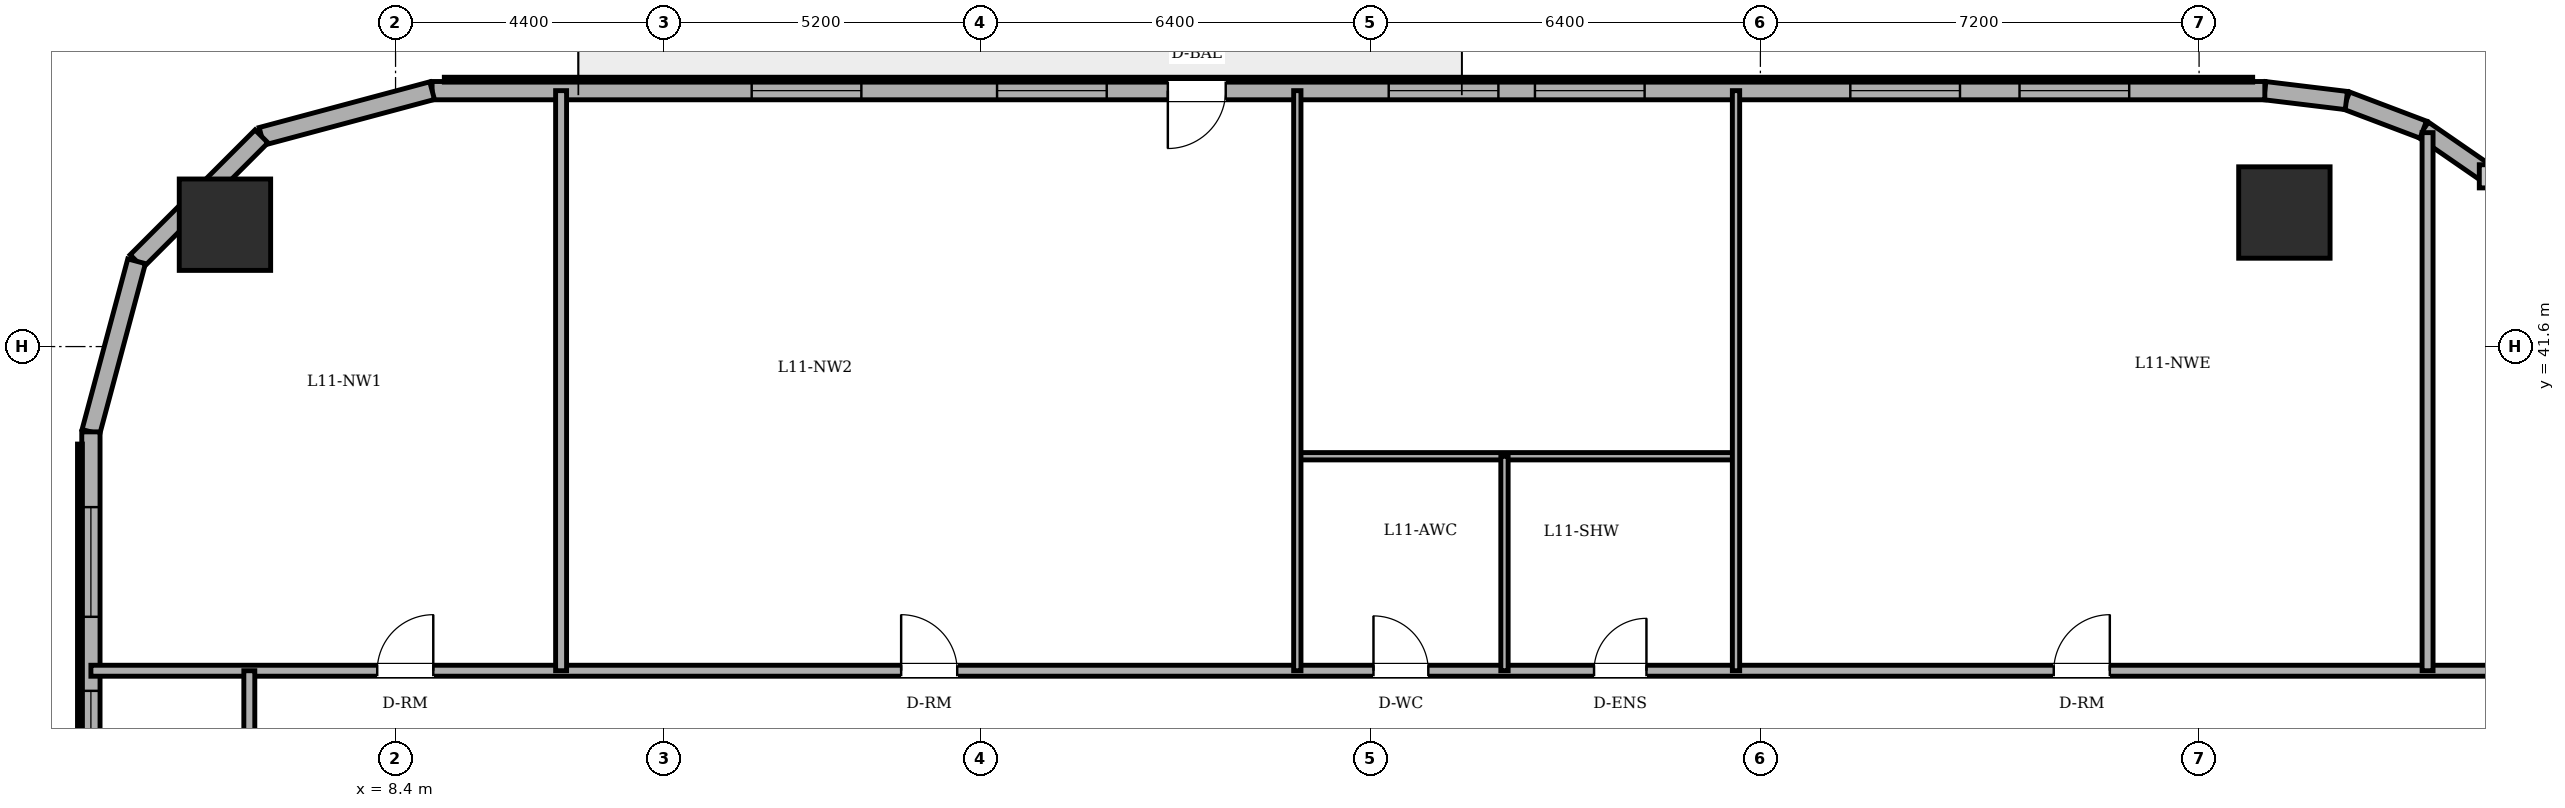
"""IFC4 building model, lengths in metres.
Left out: names, types, materials, properties, quantities, classifications, styles, units other than length and angle.
Written with IfcOpenShell. Run it as: python <this file> out.ifc"""

import sys

from ifc_helpers import new_model, si_unit, direction, frame, frame_2d, origin, origin_2d, place, context, subcontext, project, spatial, rectangle, circle, extrude, element, fill, save


model = new_model("IFC4")
c1 = context("Model", 3, precision=1e-05, world=origin(), true_north=direction((0.0, 1.0)))
c2 = subcontext(c1, "Body", "Model", "MODEL_VIEW")
j1 = project(units=[si_unit("LENGTHUNIT", "METRE"), si_unit("PLANEANGLEUNIT", "RADIAN")], contexts=[c1])
p1 = place(None, origin())
s1 = spatial("IfcSite", under=j1, at=p1, CompositionType="ELEMENT")
p2 = place(p1, origin())
s2 = spatial("IfcBuilding", under=s1, at=p2, CompositionType="ELEMENT")
p3 = place(p2, frame((0.0, 0.0, 43.2)))
s3 = spatial("IfcBuildingStorey", under=s2, at=p3, CompositionType="ELEMENT", Elevation=43.2)
for number, where, z_axis, x_axis in (
    (1, (39.4, 43.8, 0.0), (0.0, 0.0, 1.0), (1.0, 0.0, 0.0)),
    (2, (5.6, 43.6, 0.0), (0.0, 0.0, 1.0), (1.0, 0.0, 0.0)),
):
    element("IfcColumn", number, at=place(p3, frame(where, z_axis=z_axis, x_axis=x_axis)), inside=s3, PredefinedType="COLUMN", context=c2, shape_type="SweptSolid", body=[
        extrude(circle(Radius=0.75, at=origin_2d()), origin(), (0.0, 0.0, 1.0), 3.6),
    ])
p4 = place(p3, frame((42.789, 44.394, 0.0), z_axis=(0.0, 0.0, 1.0), x_axis=(-0.823116500192, 0.567872544777, 0.0)))
e3 = element("IfcWall", 3, at=p4, inside=s3, PredefinedType="SOLIDWALL", context=c2, shape_type="SweptSolid", body=[
    extrude(rectangle(XDim=1.349, YDim=0.3, at=frame_2d((0.674, 0.0))), origin(), (0.0, 0.0, 1.0), 3.4),
])
p5 = place(p3, frame((41.679, 45.16, 0.0), z_axis=(0.0, 0.0, 1.0), x_axis=(-0.935156721165, 0.354234254216, 0.0)))
e4 = element("IfcWall", 4, at=p5, inside=s3, PredefinedType="SOLIDWALL", context=c2, shape_type="SweptSolid", body=[
    extrude(rectangle(XDim=1.349, YDim=0.3, at=frame_2d((0.675, 0.0))), origin(), (0.0, 0.0, 1.0), 3.4),
])
p6 = place(p3, frame((40.417, 45.638, 0.0), z_axis=(0.0, 0.0, 1.0), x_axis=(-0.992739027259, 0.120288086515, 0.0)))
e5 = element("IfcWall", 5, at=p6, inside=s3, PredefinedType="SOLIDWALL", context=c2, shape_type="SweptSolid", body=[
    extrude(rectangle(XDim=1.348, YDim=0.3, at=frame_2d((0.674, 0.0))), origin(), (0.0, 0.0, 1.0), 3.4),
])
p7 = place(p3, frame((39.079, 45.8, 0.0), z_axis=(0.0, 0.0, 1.0), x_axis=(-1.0, 0.0, 0.0)))
e6 = element("IfcWall", 6, at=p7, inside=s3, PredefinedType="SOLIDWALL", context=c2, shape_type="SweptSolid", body=[
    extrude(rectangle(XDim=30.079, YDim=0.3, at=frame_2d((15.04, 0.0))), origin(), (0.0, 0.0, 1.0), 3.4),
])
p8 = place(p7, frame((17.054, 0.0, 0.0)))
e7 = element("IfcOpeningElement", 7, at=p8, cuts=e6, PredefinedType="OPENING", context=c2, shape_type="SweptSolid", body=[
    extrude(rectangle(XDim=0.95, YDim=2.2, at=frame_2d((0.475, 1.1))), frame((0.0, 0.16, 0.0), z_axis=(0.0, -1.0, 0.0), x_axis=(1.0, 0.0, 0.0)), (0.0, 0.0, 1.0), 0.32),
])
p9 = place(p7, frame((2.226, 0.0, 0.85)))
e8 = element("IfcOpeningElement", 8, at=p9, cuts=e6, PredefinedType="OPENING", context=c2, shape_type="SweptSolid", body=[
    extrude(rectangle(XDim=1.8, YDim=1.55, at=frame_2d((0.9, 0.775))), frame((0.0, 0.16, 0.0), z_axis=(0.0, -1.0, 0.0), x_axis=(1.0, 0.0, 0.0)), (0.0, 0.0, 1.0), 0.32),
])
p10 = place(p7, frame((5.003, 0.0, 0.85)))
e9 = element("IfcOpeningElement", 9, at=p10, cuts=e6, PredefinedType="OPENING", context=c2, shape_type="SweptSolid", body=[
    extrude(rectangle(XDim=1.8, YDim=1.55, at=frame_2d((0.9, 0.775))), frame((0.0, 0.16, 0.0), z_axis=(0.0, -1.0, 0.0), x_axis=(1.0, 0.0, 0.0)), (0.0, 0.0, 1.0), 0.32),
])
p11 = place(p7, frame((10.179, 0.0, 0.85)))
e10 = element("IfcOpeningElement", 10, at=p11, cuts=e6, PredefinedType="OPENING", context=c2, shape_type="SweptSolid", body=[
    extrude(rectangle(XDim=1.8, YDim=1.55, at=frame_2d((0.9, 0.775))), frame((0.0, 0.16, 0.0), z_axis=(0.0, -1.0, 0.0), x_axis=(1.0, 0.0, 0.0)), (0.0, 0.0, 1.0), 0.32),
])
p12 = place(p7, frame((12.579, 0.0, 0.85)))
e11 = element("IfcOpeningElement", 11, at=p12, cuts=e6, PredefinedType="OPENING", context=c2, shape_type="SweptSolid", body=[
    extrude(rectangle(XDim=1.8, YDim=1.55, at=frame_2d((0.9, 0.775))), frame((0.0, 0.16, 0.0), z_axis=(0.0, -1.0, 0.0), x_axis=(1.0, 0.0, 0.0)), (0.0, 0.0, 1.0), 0.32),
])
p13 = place(p7, frame((19.007, 0.0, 0.85)))
e12 = element("IfcOpeningElement", 12, at=p13, cuts=e6, PredefinedType="OPENING", context=c2, shape_type="SweptSolid", body=[
    extrude(rectangle(XDim=1.8, YDim=1.55, at=frame_2d((0.9, 0.775))), frame((0.0, 0.16, 0.0), z_axis=(0.0, -1.0, 0.0), x_axis=(1.0, 0.0, 0.0)), (0.0, 0.0, 1.0), 0.32),
])
p14 = place(p7, frame((23.034, 0.0, 0.85)))
e13 = element("IfcOpeningElement", 13, at=p14, cuts=e6, PredefinedType="OPENING", context=c2, shape_type="SweptSolid", body=[
    extrude(rectangle(XDim=1.8, YDim=1.55, at=frame_2d((0.9, 0.775))), frame((0.0, 0.16, 0.0), z_axis=(0.0, -1.0, 0.0), x_axis=(1.0, 0.0, 0.0)), (0.0, 0.0, 1.0), 0.32),
])
p15 = place(p3, frame((9.0, 45.8, 0.0), z_axis=(0.0, 0.0, 1.0), x_axis=(-0.96594917914, -0.258731875344, 0.0)))
e14 = element("IfcWall", 14, at=p15, inside=s3, PredefinedType="SOLIDWALL", context=c2, shape_type="SweptSolid", body=[
    extrude(rectangle(XDim=2.899, YDim=0.3, at=frame_2d((1.449, 0.0))), origin(), (0.0, 0.0, 1.0), 3.4),
])
p16 = place(p3, frame((6.2, 45.05, 0.0), z_axis=(0.0, 0.0, 1.0), x_axis=(-0.707106781187, -0.707106781187, 0.0)))
e15 = element("IfcWall", 15, at=p16, inside=s3, PredefinedType="SOLIDWALL", context=c2, shape_type="SweptSolid", body=[
    extrude(rectangle(XDim=2.899, YDim=0.3, at=frame_2d((1.45, 0.0))), origin(), (0.0, 0.0, 1.0), 3.4),
])
p17 = place(p3, frame((4.15, 43.0, 0.0), z_axis=(0.0, 0.0, 1.0), x_axis=(-0.258731875344, -0.96594917914, 0.0)))
e16 = element("IfcWall", 16, at=p17, inside=s3, PredefinedType="SOLIDWALL", context=c2, shape_type="SweptSolid", body=[
    extrude(rectangle(XDim=2.899, YDim=0.3, at=frame_2d((1.449, 0.0))), origin(), (0.0, 0.0, 1.0), 3.4),
])
p18 = place(p3, frame((3.4, 40.2, 0.0), z_axis=(0.0, 0.0, 1.0), x_axis=(0.0, -1.0, 0.0)))
e17 = element("IfcWall", 17, at=p18, inside=s3, PredefinedType="SOLIDWALL", context=c2, shape_type="SweptSolid", body=[
    extrude(rectangle(XDim=32.4, YDim=0.3, at=frame_2d((16.2, 0.0))), origin(), (0.0, 0.0, 1.0), 3.4),
])
p19 = place(p18, frame((1.235, 0.0, 0.85)))
e18 = element("IfcOpeningElement", 18, at=p19, cuts=e17, PredefinedType="OPENING", context=c2, shape_type="SweptSolid", body=[
    extrude(rectangle(XDim=1.8, YDim=1.55, at=frame_2d((0.9, 0.775))), frame((0.0, 0.16, 0.0), z_axis=(0.0, -1.0, 0.0), x_axis=(1.0, 0.0, 0.0)), (0.0, 0.0, 1.0), 0.32),
])
p20 = place(p18, frame((4.25, 0.0, 0.85)))
e19 = element("IfcOpeningElement", 19, at=p20, cuts=e17, PredefinedType="OPENING", context=c2, shape_type="SweptSolid", body=[
    extrude(rectangle(XDim=1.8, YDim=1.55, at=frame_2d((0.9, 0.775))), frame((0.0, 0.16, 0.0), z_axis=(0.0, -1.0, 0.0), x_axis=(1.0, 0.0, 0.0)), (0.0, 0.0, 1.0), 0.32),
])
p21 = place(p18, frame((9.253, 0.0, 0.85)))
e20 = element("IfcOpeningElement", 20, at=p21, cuts=e17, PredefinedType="OPENING", context=c2, shape_type="SweptSolid", body=[
    extrude(rectangle(XDim=1.8, YDim=1.55, at=frame_2d((0.9, 0.775))), frame((0.0, 0.16, 0.0), z_axis=(0.0, -1.0, 0.0), x_axis=(1.0, 0.0, 0.0)), (0.0, 0.0, 1.0), 0.32),
])
p22 = place(p18, frame((13.027, 0.0, 0.85)))
e21 = element("IfcOpeningElement", 21, at=p22, cuts=e17, PredefinedType="OPENING", context=c2, shape_type="SweptSolid", body=[
    extrude(rectangle(XDim=1.8, YDim=1.55, at=frame_2d((0.9, 0.775))), frame((0.0, 0.16, 0.0), z_axis=(0.0, -1.0, 0.0), x_axis=(1.0, 0.0, 0.0)), (0.0, 0.0, 1.0), 0.32),
])
p23 = place(p18, frame((19.573, 0.0, 0.85)))
e22 = element("IfcOpeningElement", 22, at=p23, cuts=e17, PredefinedType="OPENING", context=c2, shape_type="SweptSolid", body=[
    extrude(rectangle(XDim=1.8, YDim=1.55, at=frame_2d((0.9, 0.775))), frame((0.0, 0.16, 0.0), z_axis=(0.0, -1.0, 0.0), x_axis=(1.0, 0.0, 0.0)), (0.0, 0.0, 1.0), 0.32),
])
p24 = place(p18, frame((22.347, 0.0, 0.85)))
e23 = element("IfcOpeningElement", 23, at=p24, cuts=e17, PredefinedType="OPENING", context=c2, shape_type="SweptSolid", body=[
    extrude(rectangle(XDim=1.8, YDim=1.55, at=frame_2d((0.9, 0.775))), frame((0.0, 0.16, 0.0), z_axis=(0.0, -1.0, 0.0), x_axis=(1.0, 0.0, 0.0)), (0.0, 0.0, 1.0), 0.32),
])
p25 = place(p18, frame((26.35, 0.0, 0.85)))
e24 = element("IfcOpeningElement", 24, at=p25, cuts=e17, PredefinedType="OPENING", context=c2, shape_type="SweptSolid", body=[
    extrude(rectangle(XDim=1.8, YDim=1.55, at=frame_2d((0.9, 0.775))), frame((0.0, 0.16, 0.0), z_axis=(0.0, -1.0, 0.0), x_axis=(1.0, 0.0, 0.0)), (0.0, 0.0, 1.0), 0.32),
])
p26 = place(p18, frame((29.365, 0.0, 0.85)))
e25 = element("IfcOpeningElement", 25, at=p26, cuts=e17, PredefinedType="OPENING", context=c2, shape_type="SweptSolid", body=[
    extrude(rectangle(XDim=1.8, YDim=1.55, at=frame_2d((0.9, 0.775))), frame((0.0, 0.16, 0.0), z_axis=(0.0, -1.0, 0.0), x_axis=(1.0, 0.0, 0.0)), (0.0, 0.0, 1.0), 0.32),
])
p27 = place(p3, frame((3.4, 36.28, 0.0), z_axis=(0.0, 0.0, 1.0), x_axis=(1.0, 0.0, 0.0)))
e26 = element("IfcWall", 26, at=p27, inside=s3, PredefinedType="PARTITIONING", context=c2, shape_type="SweptSolid", body=[
    extrude(rectangle(XDim=47.689, YDim=0.18, at=frame_2d((23.845, 0.0))), origin(), (0.0, 0.0, 1.0), 3.4),
])
p28 = place(p27, frame((21.05, 0.0, 0.0)))
e27 = element("IfcOpeningElement", 27, at=p28, cuts=e26, PredefinedType="OPENING", context=c2, shape_type="SweptSolid", body=[
    extrude(rectangle(XDim=0.9, YDim=2.1, at=frame_2d((0.45, 1.05))), frame((0.0, 0.1, 0.0), z_axis=(0.0, -1.0, 0.0), x_axis=(1.0, 0.0, 0.0)), (0.0, 0.0, 1.0), 0.2),
])
p29 = place(p27, frame((24.67, 0.0, 0.0)))
e28 = element("IfcOpeningElement", 28, at=p29, cuts=e26, PredefinedType="OPENING", context=c2, shape_type="SweptSolid", body=[
    extrude(rectangle(XDim=0.86, YDim=2.1, at=frame_2d((0.43, 1.05))), frame((0.0, 0.1, 0.0), z_axis=(0.0, -1.0, 0.0), x_axis=(1.0, 0.0, 0.0)), (0.0, 0.0, 1.0), 0.2),
])
p30 = place(p27, frame((40.39, 0.0, 0.0)))
e29 = element("IfcOpeningElement", 29, at=p30, cuts=e26, PredefinedType="OPENING", context=c2, shape_type="SweptSolid", body=[
    extrude(rectangle(XDim=0.92, YDim=2.1, at=frame_2d((0.46, 1.05))), frame((0.0, 0.1, 0.0), z_axis=(0.0, -1.0, 0.0), x_axis=(1.0, 0.0, 0.0)), (0.0, 0.0, 1.0), 0.2),
])
p31 = place(p27, frame((4.699, 0.0, 0.0)))
e30 = element("IfcOpeningElement", 30, at=p31, cuts=e26, PredefinedType="OPENING", context=c2, shape_type="SweptSolid", body=[
    extrude(rectangle(XDim=0.92, YDim=2.1, at=frame_2d((0.46, 1.05))), frame((0.0, 0.1, 0.0), z_axis=(0.0, -1.0, 0.0), x_axis=(1.0, 0.0, 0.0)), (0.0, 0.0, 1.0), 0.2),
])
p32 = place(p27, frame((13.298, 0.0, 0.0)))
e31 = element("IfcOpeningElement", 31, at=p32, cuts=e26, PredefinedType="OPENING", context=c2, shape_type="SweptSolid", body=[
    extrude(rectangle(XDim=0.92, YDim=2.1, at=frame_2d((0.46, 1.05))), frame((0.0, 0.1, 0.0), z_axis=(0.0, -1.0, 0.0), x_axis=(1.0, 0.0, 0.0)), (0.0, 0.0, 1.0), 0.2),
])
p33 = place(p27, frame((32.215, 0.0, 0.0)))
e32 = element("IfcOpeningElement", 32, at=p33, cuts=e26, PredefinedType="OPENING", context=c2, shape_type="SweptSolid", body=[
    extrude(rectangle(XDim=0.92, YDim=2.1, at=frame_2d((0.46, 1.05))), frame((0.0, 0.1, 0.0), z_axis=(0.0, -1.0, 0.0), x_axis=(1.0, 0.0, 0.0)), (0.0, 0.0, 1.0), 0.2),
])
p34 = place(p3, frame((23.2, 39.8, 0.0), z_axis=(0.0, 0.0, 1.0), x_axis=(1.0, 0.0, 0.0)))
e33 = element("IfcWall", 33, at=p34, inside=s3, PredefinedType="PARTITIONING", context=c2, shape_type="SweptSolid", body=[
    extrude(rectangle(XDim=7.2, YDim=0.12, at=frame_2d((3.6, 0.0))), origin(), (0.0, 0.0, 1.0), 3.4),
])
p35 = place(p3, frame((6.0, 33.82, 0.0), z_axis=(0.0, 0.0, 1.0), x_axis=(0.0, 1.0, 0.0)))
e34 = element("IfcWall", 34, at=p35, inside=s3, PredefinedType="PARTITIONING", context=c2, shape_type="SweptSolid", body=[
    extrude(rectangle(XDim=2.46, YDim=0.18, at=frame_2d((1.23, 0.0))), origin(), (0.0, 0.0, 1.0), 3.4),
])
p36 = place(p3, frame((11.117, 36.28, 0.0), z_axis=(0.0, 0.0, 1.0), x_axis=(0.0, 1.0, 0.0)))
e35 = element("IfcWall", 35, at=p36, inside=s3, PredefinedType="PARTITIONING", context=c2, shape_type="SweptSolid", body=[
    extrude(rectangle(XDim=9.52, YDim=0.18, at=frame_2d((4.76, 0.0))), origin(), (0.0, 0.0, 1.0), 3.4),
])
p37 = place(p3, frame((23.2, 36.28, 0.0), z_axis=(0.0, 0.0, 1.0), x_axis=(0.0, 1.0, 0.0)))
e36 = element("IfcWall", 36, at=p37, inside=s3, PredefinedType="PARTITIONING", context=c2, shape_type="SweptSolid", body=[
    extrude(rectangle(XDim=9.52, YDim=0.12, at=frame_2d((4.76, 0.0))), origin(), (0.0, 0.0, 1.0), 3.4),
])
p38 = place(p3, frame((26.6, 36.28, 0.0), z_axis=(0.0, 0.0, 1.0), x_axis=(0.0, 1.0, 0.0)))
e37 = element("IfcWall", 37, at=p38, inside=s3, PredefinedType="PARTITIONING", context=c2, shape_type="SweptSolid", body=[
    extrude(rectangle(XDim=3.52, YDim=0.12, at=frame_2d((1.76, 0.0))), origin(), (0.0, 0.0, 1.0), 3.4),
])
p39 = place(p3, frame((30.4, 36.28, 0.0), z_axis=(0.0, 0.0, 1.0), x_axis=(0.0, 1.0, 0.0)))
e38 = element("IfcWall", 38, at=p39, inside=s3, PredefinedType="PARTITIONING", context=c2, shape_type="SweptSolid", body=[
    extrude(rectangle(XDim=9.52, YDim=0.12, at=frame_2d((4.76, 0.0))), origin(), (0.0, 0.0, 1.0), 3.4),
])
p40 = place(p3, frame((41.75, 36.28, 0.0), z_axis=(0.0, 0.0, 1.0), x_axis=(0.0, 1.0, 0.0)))
e39 = element("IfcWall", 39, at=p40, inside=s3, PredefinedType="PARTITIONING", context=c2, shape_type="SweptSolid", body=[
    extrude(rectangle(XDim=8.831, YDim=0.18, at=frame_2d((4.416, 0.0))), origin(), (0.0, 0.0, 1.0), 2.782),
])
p41 = place(p8, origin())
e40 = element("IfcDoor", 40, at=p41, inside=s3, OperationType="SINGLE_SWING_RIGHT", PredefinedType="DOOR", context=c2, shape_type="SweptSolid", body=[
    extrude(rectangle(XDim=0.95, YDim=2.2, at=frame_2d((0.475, 1.1))), frame((0.0, 0.025, 0.0), z_axis=(0.0, -1.0, 0.0), x_axis=(1.0, 0.0, 0.0)), (0.0, 0.0, 1.0), 0.05),
])
fill(e7, e40)
p42 = place(p9, origin())
e41 = element("IfcWindow", 41, at=p42, inside=s3, PartitioningType="DOUBLE_PANEL_VERTICAL", PredefinedType="WINDOW", context=c2, shape_type="SweptSolid", body=[
    extrude(rectangle(XDim=1.8, YDim=1.55, at=frame_2d((0.9, 0.775))), frame((0.0, 0.03, 0.0), z_axis=(0.0, -1.0, 0.0), x_axis=(1.0, 0.0, 0.0)), (0.0, 0.0, 1.0), 0.06),
])
fill(e8, e41)
p43 = place(p10, origin())
e42 = element("IfcWindow", 42, at=p43, inside=s3, PartitioningType="DOUBLE_PANEL_VERTICAL", PredefinedType="WINDOW", context=c2, shape_type="SweptSolid", body=[
    extrude(rectangle(XDim=1.8, YDim=1.55, at=frame_2d((0.9, 0.775))), frame((0.0, 0.03, 0.0), z_axis=(0.0, -1.0, 0.0), x_axis=(1.0, 0.0, 0.0)), (0.0, 0.0, 1.0), 0.06),
])
fill(e9, e42)
p44 = place(p11, origin())
e43 = element("IfcWindow", 43, at=p44, inside=s3, PartitioningType="DOUBLE_PANEL_VERTICAL", PredefinedType="WINDOW", context=c2, shape_type="SweptSolid", body=[
    extrude(rectangle(XDim=1.8, YDim=1.55, at=frame_2d((0.9, 0.775))), frame((0.0, 0.03, 0.0), z_axis=(0.0, -1.0, 0.0), x_axis=(1.0, 0.0, 0.0)), (0.0, 0.0, 1.0), 0.06),
])
fill(e10, e43)
p45 = place(p12, origin())
e44 = element("IfcWindow", 44, at=p45, inside=s3, PartitioningType="DOUBLE_PANEL_VERTICAL", PredefinedType="WINDOW", context=c2, shape_type="SweptSolid", body=[
    extrude(rectangle(XDim=1.8, YDim=1.55, at=frame_2d((0.9, 0.775))), frame((0.0, 0.03, 0.0), z_axis=(0.0, -1.0, 0.0), x_axis=(1.0, 0.0, 0.0)), (0.0, 0.0, 1.0), 0.06),
])
fill(e11, e44)
p46 = place(p13, origin())
e45 = element("IfcWindow", 45, at=p46, inside=s3, PartitioningType="DOUBLE_PANEL_VERTICAL", PredefinedType="WINDOW", context=c2, shape_type="SweptSolid", body=[
    extrude(rectangle(XDim=1.8, YDim=1.55, at=frame_2d((0.9, 0.775))), frame((0.0, 0.03, 0.0), z_axis=(0.0, -1.0, 0.0), x_axis=(1.0, 0.0, 0.0)), (0.0, 0.0, 1.0), 0.06),
])
fill(e12, e45)
p47 = place(p14, origin())
e46 = element("IfcWindow", 46, at=p47, inside=s3, PartitioningType="DOUBLE_PANEL_VERTICAL", PredefinedType="WINDOW", context=c2, shape_type="SweptSolid", body=[
    extrude(rectangle(XDim=1.8, YDim=1.55, at=frame_2d((0.9, 0.775))), frame((0.0, 0.03, 0.0), z_axis=(0.0, -1.0, 0.0), x_axis=(1.0, 0.0, 0.0)), (0.0, 0.0, 1.0), 0.06),
])
fill(e13, e46)
p48 = place(p19, origin())
e47 = element("IfcWindow", 47, at=p48, inside=s3, PartitioningType="DOUBLE_PANEL_VERTICAL", PredefinedType="WINDOW", context=c2, shape_type="SweptSolid", body=[
    extrude(rectangle(XDim=1.8, YDim=1.55, at=frame_2d((0.9, 0.775))), frame((0.0, 0.03, 0.0), z_axis=(0.0, -1.0, 0.0), x_axis=(1.0, 0.0, 0.0)), (0.0, 0.0, 1.0), 0.06),
])
fill(e18, e47)
p49 = place(p20, origin())
e48 = element("IfcWindow", 48, at=p49, inside=s3, PartitioningType="DOUBLE_PANEL_VERTICAL", PredefinedType="WINDOW", context=c2, shape_type="SweptSolid", body=[
    extrude(rectangle(XDim=1.8, YDim=1.55, at=frame_2d((0.9, 0.775))), frame((0.0, 0.03, 0.0), z_axis=(0.0, -1.0, 0.0), x_axis=(1.0, 0.0, 0.0)), (0.0, 0.0, 1.0), 0.06),
])
fill(e19, e48)
p50 = place(p28, origin())
e49 = element("IfcDoor", 49, at=p50, inside=s3, OperationType="SINGLE_SWING_LEFT", PredefinedType="DOOR", context=c2, shape_type="SweptSolid", body=[
    extrude(rectangle(XDim=0.9, YDim=2.1, at=frame_2d((0.45, 1.05))), frame((0.0, 0.025, 0.0), z_axis=(0.0, -1.0, 0.0), x_axis=(1.0, 0.0, 0.0)), (0.0, 0.0, 1.0), 0.05),
])
fill(e27, e49)
p51 = place(p29, origin())
e50 = element("IfcDoor", 50, at=p51, inside=s3, OperationType="SINGLE_SWING_RIGHT", PredefinedType="DOOR", context=c2, shape_type="SweptSolid", body=[
    extrude(rectangle(XDim=0.86, YDim=2.1, at=frame_2d((0.43, 1.05))), frame((0.0, 0.025, 0.0), z_axis=(0.0, -1.0, 0.0), x_axis=(1.0, 0.0, 0.0)), (0.0, 0.0, 1.0), 0.05),
])
fill(e28, e50)
p52 = place(p31, origin())
e51 = element("IfcDoor", 51, at=p52, inside=s3, OperationType="SINGLE_SWING_RIGHT", PredefinedType="DOOR", context=c2, shape_type="SweptSolid", body=[
    extrude(rectangle(XDim=0.92, YDim=2.1, at=frame_2d((0.46, 1.05))), frame((0.0, 0.025, 0.0), z_axis=(0.0, -1.0, 0.0), x_axis=(1.0, 0.0, 0.0)), (0.0, 0.0, 1.0), 0.05),
])
fill(e30, e51)
p53 = place(p32, origin())
e52 = element("IfcDoor", 52, at=p53, inside=s3, OperationType="SINGLE_SWING_LEFT", PredefinedType="DOOR", context=c2, shape_type="SweptSolid", body=[
    extrude(rectangle(XDim=0.92, YDim=2.1, at=frame_2d((0.46, 1.05))), frame((0.0, 0.025, 0.0), z_axis=(0.0, -1.0, 0.0), x_axis=(1.0, 0.0, 0.0)), (0.0, 0.0, 1.0), 0.05),
])
fill(e31, e52)
p54 = place(p33, origin())
e53 = element("IfcDoor", 53, at=p54, inside=s3, OperationType="SINGLE_SWING_RIGHT", PredefinedType="DOOR", context=c2, shape_type="SweptSolid", body=[
    extrude(rectangle(XDim=0.92, YDim=2.1, at=frame_2d((0.46, 1.05))), frame((0.0, 0.025, 0.0), z_axis=(0.0, -1.0, 0.0), x_axis=(1.0, 0.0, 0.0)), (0.0, 0.0, 1.0), 0.05),
])
fill(e32, e53)
save(model, sys.argv[1])
